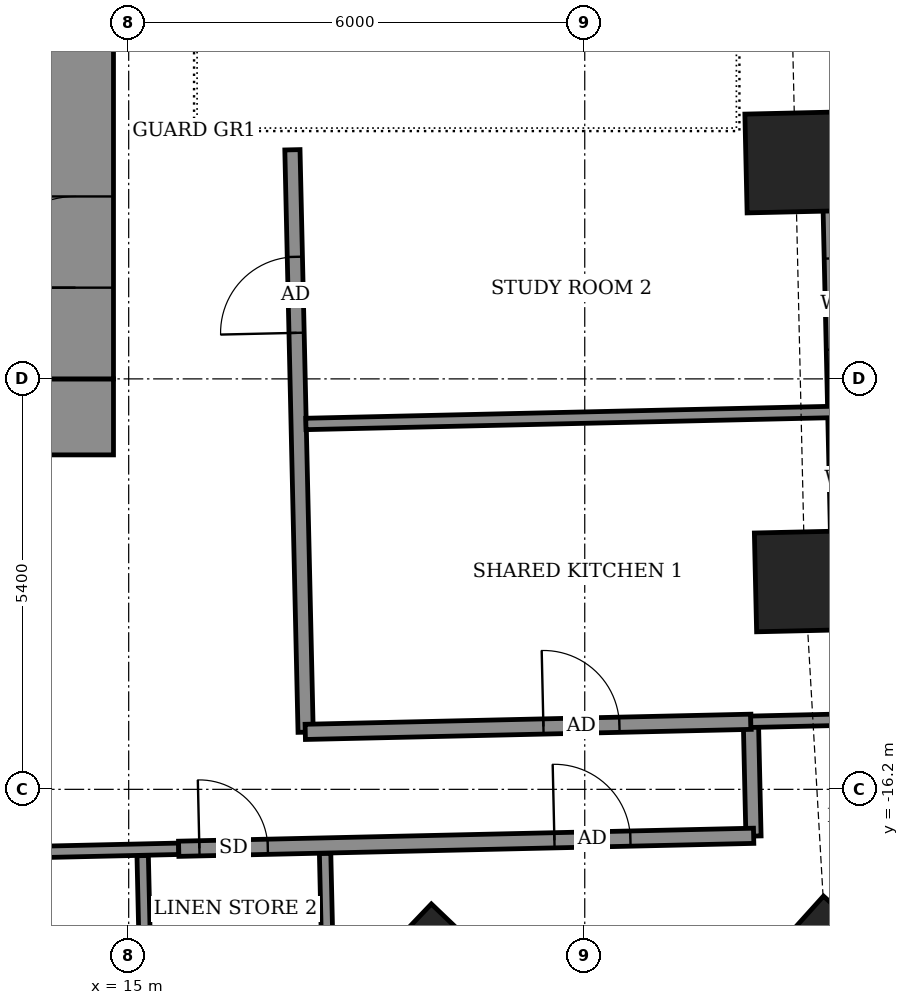
"""IFC4 building model, lengths in metres.
Left out: names, types, materials, properties, quantities, classifications, styles, units other than length and angle.
Written with IfcOpenShell. Run it as: python <this file> out.ifc"""

import sys

from ifc_helpers import new_model, si_unit, direction, frame, frame_2d, origin, origin_2d, place, context, subcontext, project, spatial, rectangle, extrude, element, fill, save


model = new_model("IFC4")
c1 = context("Model", 3, precision=1e-05, world=origin(), true_north=direction((0.0, 1.0)))
c2 = subcontext(c1, "Body", "Model", "MODEL_VIEW")
j1 = project(units=[si_unit("LENGTHUNIT", "METRE"), si_unit("PLANEANGLEUNIT", "RADIAN")], contexts=[c1])
p1 = place(None, origin())
s1 = spatial("IfcSite", under=j1, at=p1, CompositionType="ELEMENT")
p2 = place(p1, origin())
s2 = spatial("IfcBuilding", under=s1, at=p2, CompositionType="ELEMENT")
p3 = place(p2, frame((0.0, 0.0, 137.3)))
s3 = spatial("IfcBuildingStorey", under=s2, at=p3, CompositionType="ELEMENT", Elevation=137.3)
for number, where, z_axis, x_axis in (
    (1, (19.003, -18.627, -0.55), (0.0, 0.0, 1.0), (0.691, 0.723, 0.0)),
    (2, (24.188, -18.523, -0.55), (0.0, 0.0, 1.0), (0.67, 0.743, 0.0)),
    (3, (23.896, -13.463, -0.55), (0.0, 0.0, 1.0), (-0.023, 1.0, 0.0)),
    (4, (23.771, -7.952, -0.55), (0.0, 0.0, 1.0), (-0.023, 1.0, 0.0)),
):
    element("IfcColumn", number, at=place(p3, frame(where, z_axis=z_axis, x_axis=x_axis)), inside=s3, PredefinedType="COLUMN", context=c2, shape_type="SweptSolid", body=[
        extrude(rectangle(XDim=1.3, YDim=1.3, at=origin_2d()), origin(), (0.0, 0.0, 1.0), 3.6),
    ])
p4 = place(p3, frame((24.518, -18.812, 0.0), z_axis=(0.0, 0.0, 1.0), x_axis=(-0.02269451316, 0.999742446369, 0.0)))
e5 = element("IfcWall", 5, at=p4, inside=s3, PredefinedType="SOLIDWALL", context=c2, shape_type="SweptSolid", body=[
    extrude(rectangle(XDim=10.93, YDim=0.3, at=frame_2d((5.465, 0.0))), origin(), (0.0, 0.0, 1.0), 3.05),
])
p5 = place(p4, frame((1.496, 0.0, 0.0)))
e6 = element("IfcOpeningElement", 6, at=p5, cuts=e5, PredefinedType="OPENING", context=c2, shape_type="SweptSolid", body=[
    extrude(rectangle(XDim=1.5, YDim=2.4, at=frame_2d((0.75, 1.2))), frame((0.0, 0.16, 0.0), z_axis=(0.0, -1.0, 0.0), x_axis=(1.0, 0.0, 0.0)), (0.0, 0.0, 1.0), 0.32),
])
p6 = place(p4, frame((6.244, 0.0, 0.9)))
e7 = element("IfcOpeningElement", 7, at=p6, cuts=e5, PredefinedType="OPENING", context=c2, shape_type="SweptSolid", body=[
    extrude(rectangle(XDim=0.9, YDim=1.5, at=frame_2d((0.45, 0.75))), frame((0.0, 0.16, 0.0), z_axis=(0.0, -1.0, 0.0), x_axis=(1.0, 0.0, 0.0)), (0.0, 0.0, 1.0), 0.32),
])
p7 = place(p4, frame((8.4, 0.0, 0.9)))
e8 = element("IfcOpeningElement", 8, at=p7, cuts=e5, PredefinedType="OPENING", context=c2, shape_type="SweptSolid", body=[
    extrude(rectangle(XDim=1.2, YDim=1.5, at=frame_2d((0.6, 0.75))), frame((0.0, 0.16, 0.0), z_axis=(0.0, -1.0, 0.0), x_axis=(1.0, 0.0, 0.0)), (0.0, 0.0, 1.0), 0.32),
])
p8 = place(p3, frame((15.343, -24.072, 0.0), z_axis=(0.0, 0.0, 1.0), x_axis=(-0.022699227919, 0.999742339331, 0.0)))
e9 = element("IfcWall", 9, at=p8, inside=s3, PredefinedType="PARTITIONING", context=c2, shape_type="SweptSolid", body=[
    extrude(rectangle(XDim=7.002, YDim=0.15, at=frame_2d((3.501, 0.0))), origin(), (0.0, 0.0, 1.0), 2.55),
])
p9 = place(p3, frame((17.632, -19.142, 0.0), z_axis=(0.0, 0.0, 1.0), x_axis=(-0.022906293375, 0.999737616439, 0.0)))
e10 = element("IfcWall", 10, at=p9, inside=s3, PredefinedType="PARTITIONING", context=c2, shape_type="SweptSolid", body=[
    extrude(rectangle(XDim=2.1, YDim=0.15, at=frame_2d((1.05, 0.0))), origin(), (0.0, 0.0, 1.0), 3.05),
])
p10 = place(p3, frame((23.22, -16.815, 0.0), z_axis=(0.0, 0.0, 1.0), x_axis=(-0.022617910375, 0.999744182344, 0.0)))
e11 = element("IfcWall", 11, at=p10, inside=s3, PredefinedType="PARTITIONING", context=c2, shape_type="SweptSolid", body=[
    extrude(rectangle(XDim=1.5, YDim=0.2, at=frame_2d((0.75, 0.0))), origin(), (0.0, 0.0, 1.0), 3.05),
])
p11 = place(p3, frame((-14.871, -17.675, 0.0), z_axis=(0.0, 0.0, 1.0), x_axis=(0.999742359486, 0.02269834024, 0.0)))
e12 = element("IfcWall", 12, at=p11, inside=s3, PredefinedType="PARTITIONING", context=c2, shape_type="SweptSolid", body=[
    extrude(rectangle(XDim=30.536, YDim=0.15, at=frame_2d((15.268, 0.0))), origin(), (0.0, 0.0, 1.0), 3.05),
])
p12 = place(p11, frame((1.034, 0.0, 0.0)))
e13 = element("IfcOpeningElement", 13, at=p12, cuts=e12, PredefinedType="OPENING", context=c2, shape_type="SweptSolid", body=[
    extrude(rectangle(XDim=0.9, YDim=2.1, at=frame_2d((0.45, 1.05))), frame((0.0, 0.085, 0.0), z_axis=(0.0, -1.0, 0.0), x_axis=(1.0, 0.0, 0.0)), (0.0, 0.0, 1.0), 0.17),
])
p13 = place(p11, frame((7.659, 0.0, 0.0)))
e14 = element("IfcOpeningElement", 14, at=p13, cuts=e12, PredefinedType="OPENING", context=c2, shape_type="SweptSolid", body=[
    extrude(rectangle(XDim=0.9, YDim=2.1, at=frame_2d((0.45, 1.05))), frame((0.0, 0.085, 0.0), z_axis=(0.0, -1.0, 0.0), x_axis=(1.0, 0.0, 0.0)), (0.0, 0.0, 1.0), 0.17),
])
p14 = place(p11, frame((9.459, 0.0, 0.0)))
e15 = element("IfcOpeningElement", 15, at=p14, cuts=e12, PredefinedType="OPENING", context=c2, shape_type="SweptSolid", body=[
    extrude(rectangle(XDim=0.9, YDim=2.1, at=frame_2d((0.45, 1.05))), frame((0.0, 0.085, 0.0), z_axis=(0.0, -1.0, 0.0), x_axis=(1.0, 0.0, 0.0)), (0.0, 0.0, 1.0), 0.17),
])
p15 = place(p11, frame((16.084, 0.0, 0.0)))
e16 = element("IfcOpeningElement", 16, at=p15, cuts=e12, PredefinedType="OPENING", context=c2, shape_type="SweptSolid", body=[
    extrude(rectangle(XDim=0.9, YDim=2.1, at=frame_2d((0.45, 1.05))), frame((0.0, 0.085, 0.0), z_axis=(0.0, -1.0, 0.0), x_axis=(1.0, 0.0, 0.0)), (0.0, 0.0, 1.0), 0.17),
])
p16 = place(p11, frame((17.909, 0.0, 0.0)))
e17 = element("IfcOpeningElement", 17, at=p16, cuts=e12, PredefinedType="OPENING", context=c2, shape_type="SweptSolid", body=[
    extrude(rectangle(XDim=0.9, YDim=2.1, at=frame_2d((0.45, 1.05))), frame((0.0, 0.085, 0.0), z_axis=(0.0, -1.0, 0.0), x_axis=(1.0, 0.0, 0.0)), (0.0, 0.0, 1.0), 0.17),
])
p17 = place(p11, frame((24.509, 0.0, 0.0)))
e18 = element("IfcOpeningElement", 18, at=p17, cuts=e12, PredefinedType="OPENING", context=c2, shape_type="SweptSolid", body=[
    extrude(rectangle(XDim=0.9, YDim=2.1, at=frame_2d((0.45, 1.05))), frame((0.0, 0.085, 0.0), z_axis=(0.0, -1.0, 0.0), x_axis=(1.0, 0.0, 0.0)), (0.0, 0.0, 1.0), 0.17),
])
p18 = place(p11, frame((26.309, 0.0, 0.0)))
e19 = element("IfcOpeningElement", 19, at=p18, cuts=e12, PredefinedType="OPENING", context=c2, shape_type="SweptSolid", body=[
    extrude(rectangle(XDim=0.9, YDim=2.1, at=frame_2d((0.45, 1.05))), frame((0.0, 0.085, 0.0), z_axis=(0.0, -1.0, 0.0), x_axis=(1.0, 0.0, 0.0)), (0.0, 0.0, 1.0), 0.17),
])
p19 = place(p3, frame((15.658, -16.982, 0.0), z_axis=(0.0, 0.0, 1.0), x_axis=(0.99974485859, 0.022587999516, 0.0)))
e20 = element("IfcWall", 20, at=p19, inside=s3, PredefinedType="PARTITIONING", context=c2, shape_type="SweptSolid", body=[
    extrude(rectangle(XDim=7.566, YDim=0.2, at=frame_2d((3.783, 0.0))), origin(), (0.0, 0.0, 1.0), 3.05),
])
p20 = place(p19, frame((4.944, 0.0, 0.0)))
e21 = element("IfcOpeningElement", 21, at=p20, cuts=e20, PredefinedType="OPENING", context=c2, shape_type="SweptSolid", body=[
    extrude(rectangle(XDim=1.0, YDim=2.1, at=frame_2d((0.5, 1.05))), frame((0.0, 0.11, 0.0), z_axis=(0.0, -1.0, 0.0), x_axis=(1.0, 0.0, 0.0)), (0.0, 0.0, 1.0), 0.22),
])
p21 = place(p19, frame((0.272, 0.0, 0.0)))
e22 = element("IfcOpeningElement", 22, at=p21, cuts=e20, PredefinedType="OPENING", context=c2, shape_type="SweptSolid", body=[
    extrude(rectangle(XDim=0.9, YDim=2.1, at=frame_2d((0.45, 1.05))), frame((0.0, 0.11, 0.0), z_axis=(0.0, -1.0, 0.0), x_axis=(1.0, 0.0, 0.0)), (0.0, 0.0, 1.0), 0.22),
])
p22 = place(p3, frame((17.328, -15.448, 0.0), z_axis=(0.0, 0.0, 1.0), x_axis=(-0.022680883318, 0.999742755679, 0.0)))
e23 = element("IfcWall", 23, at=p22, inside=s3, PredefinedType="PARTITIONING", context=c2, shape_type="SweptSolid", body=[
    extrude(rectangle(XDim=7.664, YDim=0.2, at=frame_2d((3.832, 0.0))), origin(), (0.0, 0.0, 1.0), 3.05),
])
p23 = place(p22, frame((5.255, 0.0, 0.0)))
e24 = element("IfcOpeningElement", 24, at=p23, cuts=e23, PredefinedType="OPENING", context=c2, shape_type="SweptSolid", body=[
    extrude(rectangle(XDim=1.0, YDim=2.1, at=frame_2d((0.5, 1.05))), frame((0.0, 0.11, 0.0), z_axis=(0.0, -1.0, 0.0), x_axis=(1.0, 0.0, 0.0)), (0.0, 0.0, 1.0), 0.22),
])
p24 = place(p3, frame((17.323, -15.444, 0.0), z_axis=(0.0, 0.0, 1.0), x_axis=(0.999742758565, 0.022680756085, 0.0)))
e25 = element("IfcWall", 25, at=p24, inside=s3, PredefinedType="PARTITIONING", context=c2, shape_type="SweptSolid", body=[
    extrude(rectangle(XDim=5.866, YDim=0.2, at=frame_2d((2.933, 0.0))), origin(), (0.0, 0.0, 1.0), 3.05),
])
p25 = place(p24, frame((3.134, 0.0, 0.0)))
e26 = element("IfcOpeningElement", 26, at=p25, cuts=e25, PredefinedType="OPENING", context=c2, shape_type="SweptSolid", body=[
    extrude(rectangle(XDim=1.0, YDim=2.1, at=frame_2d((0.5, 1.05))), frame((0.0, 0.11, 0.0), z_axis=(0.0, -1.0, 0.0), x_axis=(1.0, 0.0, 0.0)), (0.0, 0.0, 1.0), 0.22),
])
p26 = place(p3, frame((23.184, -15.311, 0.0), z_axis=(0.0, 0.0, 1.0), x_axis=(0.999740577356, 0.022776698371, 0.0)))
e27 = element("IfcWall", 27, at=p26, inside=s3, PredefinedType="PARTITIONING", context=c2, shape_type="SweptSolid", body=[
    extrude(rectangle(XDim=1.404, YDim=0.15, at=frame_2d((0.702, 0.0))), origin(), (0.0, 0.0, 1.0), 2.55),
])
p27 = place(p3, frame((17.331, -11.393, 0.0), z_axis=(0.0, 0.0, 1.0), x_axis=(0.999741061159, 0.022755452803, 0.0)))
e28 = element("IfcWall", 28, at=p27, inside=s3, PredefinedType="PARTITIONING", context=c2, shape_type="SweptSolid", body=[
    extrude(rectangle(XDim=7.167, YDim=0.15, at=frame_2d((3.583, 0.0))), origin(), (0.0, 0.0, 1.0), 2.55),
])
p28 = place(p3, frame((-14.8, -11.3, 0.0), z_axis=(0.0, 0.0, 1.0), x_axis=(1.0, 0.0, 0.0)))
e29 = element("IfcWall", 29, at=p28, inside=s3, PredefinedType="SHEAR", context=c2, shape_type="SweptSolid", body=[
    extrude(rectangle(XDim=29.6, YDim=1.0, at=frame_2d((14.8, 0.0))), origin(), (0.0, 0.0, 1.0), 3.6),
])
p29 = place(p3, frame((14.3, -10.8, 0.0), z_axis=(0.0, 0.0, 1.0), x_axis=(0.0, 1.0, 0.0)))
e30 = element("IfcWall", 30, at=p29, inside=s3, PredefinedType="SHEAR", context=c2, shape_type="SweptSolid", body=[
    extrude(rectangle(XDim=21.6, YDim=1.0, at=frame_2d((10.8, 0.0))), origin(), (0.0, 0.0, 1.0), 3.6),
])
p30 = place(p29, frame((1.2, 0.0, 0.0)))
e31 = element("IfcOpeningElement", 31, at=p30, cuts=e30, PredefinedType="OPENING", context=c2, shape_type="SweptSolid", body=[
    extrude(rectangle(XDim=1.2, YDim=2.1, at=frame_2d((0.6, 1.05))), frame((0.0, 0.51, 0.0), z_axis=(0.0, -1.0, 0.0), x_axis=(1.0, 0.0, 0.0)), (0.0, 0.0, 1.0), 1.02),
])
p31 = place(p20, origin())
e32 = element("IfcDoor", 32, at=p31, inside=s3, OperationType="SINGLE_SWING_RIGHT", PredefinedType="DOOR", context=c2, shape_type="SweptSolid", body=[
    extrude(rectangle(XDim=1.0, YDim=2.1, at=frame_2d((0.5, 1.05))), frame((0.0, 0.025, 0.0), z_axis=(0.0, -1.0, 0.0), x_axis=(1.0, 0.0, 0.0)), (0.0, 0.0, 1.0), 0.05),
])
fill(e21, e32)
p32 = place(p21, origin())
e33 = element("IfcDoor", 33, at=p32, inside=s3, OperationType="SINGLE_SWING_RIGHT", PredefinedType="DOOR", context=c2, shape_type="SweptSolid", body=[
    extrude(rectangle(XDim=0.9, YDim=2.1, at=frame_2d((0.45, 1.05))), frame((0.0, 0.025, 0.0), z_axis=(0.0, -1.0, 0.0), x_axis=(1.0, 0.0, 0.0)), (0.0, 0.0, 1.0), 0.05),
])
fill(e22, e33)
p33 = place(p25, origin())
e34 = element("IfcDoor", 34, at=p33, inside=s3, OperationType="SINGLE_SWING_LEFT", PredefinedType="DOOR", context=c2, shape_type="SweptSolid", body=[
    extrude(rectangle(XDim=1.0, YDim=2.1, at=frame_2d((0.5, 1.05))), frame((0.0, 0.025, 0.0), z_axis=(0.0, -1.0, 0.0), x_axis=(1.0, 0.0, 0.0)), (0.0, 0.0, 1.0), 0.05),
])
fill(e26, e34)
p34 = place(p23, origin())
e35 = element("IfcDoor", 35, at=p34, inside=s3, OperationType="SINGLE_SWING_RIGHT", PredefinedType="DOOR", context=c2, shape_type="SweptSolid", body=[
    extrude(rectangle(XDim=1.0, YDim=2.1, at=frame_2d((0.5, 1.05))), frame((0.0, 0.025, 0.0), z_axis=(0.0, -1.0, 0.0), x_axis=(1.0, 0.0, 0.0)), (0.0, 0.0, 1.0), 0.05),
])
fill(e24, e35)
p35 = place(p30, origin())
e36 = element("IfcDoor", 36, at=p35, inside=s3, OperationType="DOUBLE_DOOR_SINGLE_SWING", PredefinedType="DOOR", context=c2, shape_type="SweptSolid", body=[
    extrude(rectangle(XDim=1.2, YDim=2.1, at=frame_2d((0.6, 1.05))), frame((0.0, 0.025, 0.0), z_axis=(0.0, -1.0, 0.0), x_axis=(1.0, 0.0, 0.0)), (0.0, 0.0, 1.0), 0.05),
])
fill(e31, e36)
save(model, sys.argv[1])
